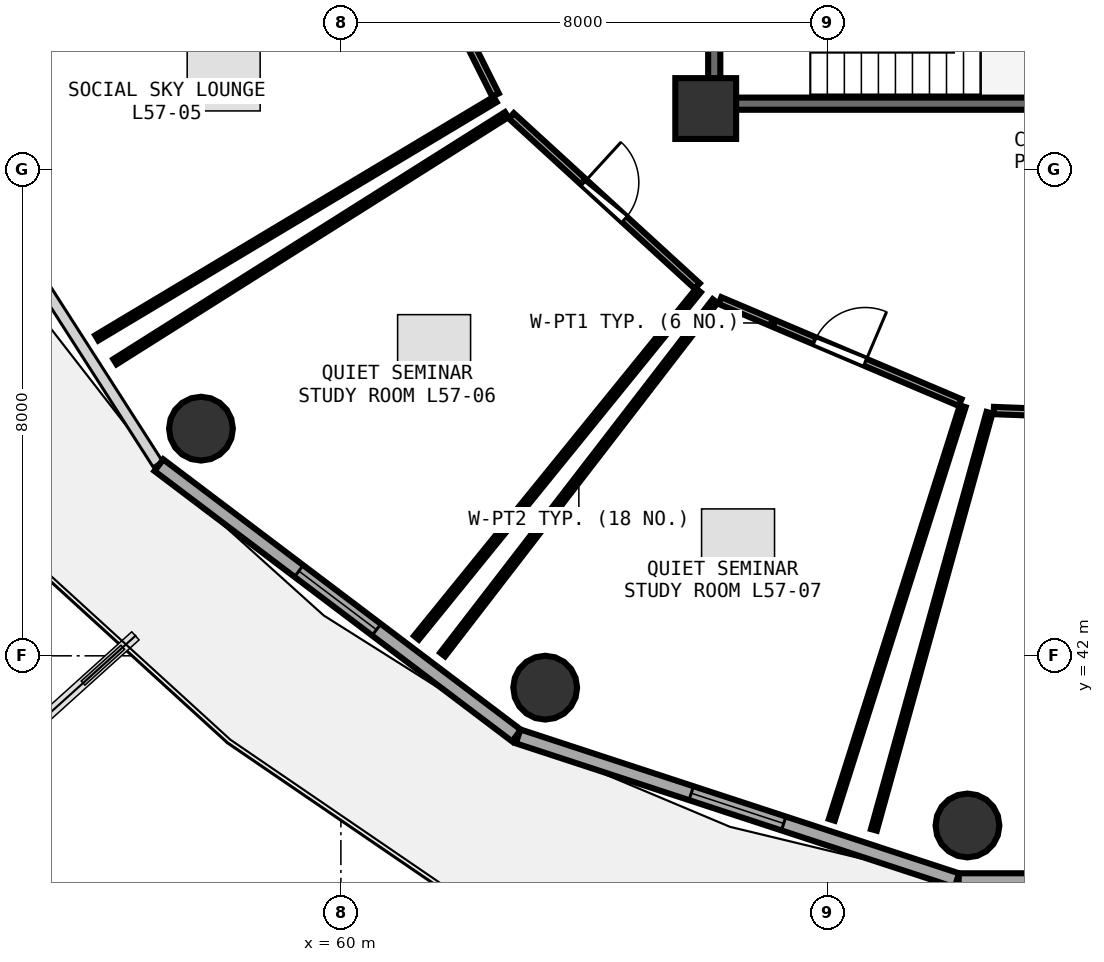
"""IFC4 building model, lengths in metres.
Left out: names, types, materials, properties, quantities, classifications, styles, units other than length and angle.
Written with IfcOpenShell. Run it as: python <this file> out.ifc"""

import sys

from ifc_helpers import new_model, si_unit, direction, frame, frame_2d, origin, origin_2d, place, context, subcontext, project, spatial, rectangle, circle, extrude, element, fill, save


model = new_model("IFC4")
c1 = context("Model", 3, precision=1e-05, world=origin(), true_north=direction((0.0, 1.0)))
c2 = subcontext(c1, "Body", "Model", "MODEL_VIEW")
j1 = project(units=[si_unit("LENGTHUNIT", "METRE"), si_unit("PLANEANGLEUNIT", "RADIAN")], contexts=[c1])
p1 = place(None, origin())
s1 = spatial("IfcSite", under=j1, at=p1, CompositionType="ELEMENT")
p2 = place(p1, origin())
s2 = spatial("IfcBuilding", under=s1, at=p2, CompositionType="ELEMENT")
p3 = place(p2, frame((0.0, 0.0, 223.2)))
s3 = spatial("IfcBuildingStorey", under=s2, at=p3, CompositionType="ELEMENT", Elevation=223.2)
p4 = place(p3, frame((66.0, 51.0, 0.0), z_axis=(0.0, 0.0, 1.0), x_axis=(1.0, 0.0, 0.0)))
e1 = element("IfcColumn", 1, at=p4, inside=s3, PredefinedType="PILASTER", context=c2, shape_type="SweptSolid", body=[
    extrude(rectangle(XDim=1.0, YDim=1.0, at=origin_2d()), origin(), (0.0, 0.0, 1.0), 3.75),
])
for number, where, z_axis, x_axis in (
    (2, (57.698, 45.736, 0.0), (0.0, 0.0, 1.0), (1.0, 0.0, 0.0)),
    (3, (63.36, 41.476, 0.0), (0.0, 0.0, 1.0), (1.0, 0.0, 0.0)),
    (4, (70.305, 39.21, 0.0), (0.0, 0.0, 1.0), (1.0, 0.0, 0.0)),
):
    element("IfcColumn", number, at=place(p3, frame(where, z_axis=z_axis, x_axis=x_axis)), inside=s3, PredefinedType="COLUMN", context=c2, shape_type="SweptSolid", body=[
        extrude(circle(Radius=0.525, at=origin_2d()), origin(), (0.0, 0.0, 1.0), 3.75),
    ])
p5 = place(p3, frame((57.006, 45.135, 0.0), z_axis=(0.0, 0.0, 1.0), x_axis=(0.797701674595, -0.603052268338, 0.0)))
e5 = element("IfcWall", 5, at=p5, inside=s3, PredefinedType="SOLIDWALL", context=c2, shape_type="SweptSolid", body=[
    extrude(rectangle(XDim=7.374, YDim=0.24, at=frame_2d((3.687, 0.0))), origin(), (0.0, 0.0, 1.0), 3.475),
])
p6 = place(p5, frame((2.887, 0.0, 0.85)))
e6 = element("IfcOpeningElement", 6, at=p6, cuts=e5, PredefinedType="OPENING", context=c2, shape_type="SweptSolid", body=[
    extrude(rectangle(XDim=1.6, YDim=1.45, at=frame_2d((0.8, 0.725))), frame((0.0, 0.13, 0.0), z_axis=(0.0, -1.0, 0.0), x_axis=(1.0, 0.0, 0.0)), (0.0, 0.0, 1.0), 0.26),
])
p7 = place(p3, frame((62.914, 40.675, 0.0), z_axis=(0.0, 0.0, 1.0), x_axis=(0.95022142767, -0.31157541366, 0.0)))
e7 = element("IfcWall", 7, at=p7, inside=s3, PredefinedType="SOLIDWALL", context=c2, shape_type="SweptSolid", body=[
    extrude(rectangle(XDim=7.594, YDim=0.24, at=frame_2d((3.797, 0.0))), origin(), (0.0, 0.0, 1.0), 3.475),
])
p8 = place(p7, frame((2.997, 0.0, 0.85)))
e8 = element("IfcOpeningElement", 8, at=p8, cuts=e7, PredefinedType="OPENING", context=c2, shape_type="SweptSolid", body=[
    extrude(rectangle(XDim=1.6, YDim=1.45, at=frame_2d((0.8, 0.725))), frame((0.0, 0.13, 0.0), z_axis=(0.0, -1.0, 0.0), x_axis=(1.0, 0.0, 0.0)), (0.0, 0.0, 1.0), 0.26),
])
p9 = place(p3, frame((70.16, 38.304, 0.0), z_axis=(0.0, 0.0, 1.0), x_axis=(1.0, 0.0, 0.0)))
e9 = element("IfcWall", 9, at=p9, inside=s3, PredefinedType="SOLIDWALL", context=c2, shape_type="SweptSolid", body=[
    extrude(rectangle(XDim=7.68, YDim=0.24, at=frame_2d((3.84, 0.0))), origin(), (0.0, 0.0, 1.0), 3.475),
])
p10 = place(p9, frame((3.04, 0.0, 0.85)))
e10 = element("IfcOpeningElement", 10, at=p10, cuts=e9, PredefinedType="OPENING", context=c2, shape_type="SweptSolid", body=[
    extrude(rectangle(XDim=1.6, YDim=1.45, at=frame_2d((0.8, 0.725))), frame((0.0, 0.13, 0.0), z_axis=(0.0, -1.0, 0.0), x_axis=(1.0, 0.0, 0.0)), (0.0, 0.0, 1.0), 0.26),
])
p11 = place(p3, frame((66.26, 51.08, 0.0), z_axis=(0.0, 0.0, 1.0), x_axis=(1.0, 0.0, 0.0)))
e11 = element("IfcWall", 11, at=p11, inside=s3, PredefinedType="SHEAR", context=c2, shape_type="SweptSolid", body=[
    extrude(rectangle(XDim=7.16, YDim=0.2, at=frame_2d((3.58, 0.0))), origin(), (0.0, 0.0, 1.0), 3.49),
])
p12 = place(p3, frame((66.14, 54.27, 0.0), z_axis=(0.0, 0.0, 1.0), x_axis=(0.0, -1.0, 0.0)))
e12 = element("IfcWall", 12, at=p12, inside=s3, PredefinedType="SHEAR", context=c2, shape_type="SweptSolid", body=[
    extrude(rectangle(XDim=3.07, YDim=0.2, at=frame_2d((1.535, 0.0))), origin(), (0.0, 0.0, 1.0), 3.49),
])
p13 = place(p12, frame((1.01, 0.0, 0.0)))
e13 = element("IfcOpeningElement", 13, at=p13, cuts=e12, PredefinedType="OPENING", context=c2, shape_type="SweptSolid", body=[
    extrude(rectangle(XDim=1.05, YDim=2.1, at=frame_2d((0.525, 1.05))), frame((0.0, 0.11, 0.0), z_axis=(0.0, -1.0, 0.0), x_axis=(1.0, 0.0, 0.0)), (0.0, 0.0, 1.0), 0.22),
])
p14 = place(p3, frame((70.738, 46.034, 0.0), z_axis=(0.0, 0.0, 1.0), x_axis=(0.99928078405, -0.037919844777, 0.0)))
e14 = element("IfcWall", 14, at=p14, inside=s3, PredefinedType="PARTITIONING", context=c2, shape_type="SweptSolid", body=[
    extrude(rectangle(XDim=5.389, YDim=0.12, at=frame_2d((2.694, 0.0))), origin(), (0.0, 0.0, 1.0), 3.025),
])
p15 = place(p14, frame((2.244, 0.0, 0.0)))
e15 = element("IfcOpeningElement", 15, at=p15, cuts=e14, PredefinedType="OPENING", context=c2, shape_type="SweptSolid", body=[
    extrude(rectangle(XDim=0.9, YDim=2.08, at=frame_2d((0.45, 1.04))), frame((0.0, 0.07, 0.0), z_axis=(0.0, -1.0, 0.0), x_axis=(1.0, 0.0, 0.0)), (0.0, 0.0, 1.0), 0.14),
])
p16 = place(p3, frame((60.753, 54.793, 0.0), z_axis=(0.0, 0.0, 1.0), x_axis=(0.448191244457, -0.893937698272, 0.0)))
e16 = element("IfcWall", 16, at=p16, inside=s3, PredefinedType="PARTITIONING", context=c2, shape_type="SweptSolid", body=[
    extrude(rectangle(XDim=3.994, YDim=0.12, at=frame_2d((1.997, 0.0))), origin(), (0.0, 0.0, 1.0), 3.025),
])
p17 = place(p16, frame((1.547, 0.0, 0.0)))
e17 = element("IfcOpeningElement", 17, at=p17, cuts=e16, PredefinedType="OPENING", context=c2, shape_type="SweptSolid", body=[
    extrude(rectangle(XDim=0.9, YDim=2.08, at=frame_2d((0.45, 1.04))), frame((0.0, 0.07, 0.0), z_axis=(0.0, -1.0, 0.0), x_axis=(1.0, 0.0, 0.0)), (0.0, 0.0, 1.0), 0.14),
])
p18 = place(p3, frame((62.803, 50.879, 0.0), z_axis=(0.0, 0.0, 1.0), x_axis=(0.737723633035, -0.675102837545, 0.0)))
e18 = element("IfcWall", 18, at=p18, inside=s3, PredefinedType="PARTITIONING", context=c2, shape_type="SweptSolid", body=[
    extrude(rectangle(XDim=4.144, YDim=0.12, at=frame_2d((2.072, 0.0))), origin(), (0.0, 0.0, 1.0), 3.025),
])
p19 = place(p18, frame((1.622, 0.0, 0.0)))
e19 = element("IfcOpeningElement", 19, at=p19, cuts=e18, PredefinedType="OPENING", context=c2, shape_type="SweptSolid", body=[
    extrude(rectangle(XDim=0.9, YDim=2.08, at=frame_2d((0.45, 1.04))), frame((0.0, 0.07, 0.0), z_axis=(0.0, -1.0, 0.0), x_axis=(1.0, 0.0, 0.0)), (0.0, 0.0, 1.0), 0.14),
])
p20 = place(p3, frame((66.233, 47.843, 0.0), z_axis=(0.0, 0.0, 1.0), x_axis=(0.920481353999, -0.390786485105, 0.0)))
e20 = element("IfcWall", 20, at=p20, inside=s3, PredefinedType="PARTITIONING", context=c2, shape_type="SweptSolid", body=[
    extrude(rectangle(XDim=4.292, YDim=0.12, at=frame_2d((2.146, 0.0))), origin(), (0.0, 0.0, 1.0), 3.235),
])
p21 = place(p20, frame((1.696, 0.0, 0.0)))
e21 = element("IfcOpeningElement", 21, at=p21, cuts=e20, PredefinedType="OPENING", context=c2, shape_type="SweptSolid", body=[
    extrude(rectangle(XDim=0.9, YDim=2.08, at=frame_2d((0.45, 1.04))), frame((0.0, 0.07, 0.0), z_axis=(0.0, -1.0, 0.0), x_axis=(1.0, 0.0, 0.0)), (0.0, 0.0, 1.0), 0.14),
])
p22 = place(p3, frame((68.766, 39.137, 0.0), z_axis=(0.0, 0.0, 1.0), x_axis=(0.267125564166, 0.96366173161, 0.0)))
e22 = element("IfcWall", 22, at=p22, inside=s3, PredefinedType="PARTITIONING", context=c2, shape_type="SweptSolid", body=[
    extrude(rectangle(XDim=7.119, YDim=0.1, at=frame_2d((3.56, 0.0))), origin(), (0.0, 0.0, 1.0), 3.075),
])
p23 = place(p3, frame((62.536, 51.148, 0.0), z_axis=(0.0, 0.0, 1.0), x_axis=(-0.858084969996, -0.513507725615, 0.0)))
e23 = element("IfcWall", 23, at=p23, inside=s3, PredefinedType="PARTITIONING", context=c2, shape_type="SweptSolid", body=[
    extrude(rectangle(XDim=7.634, YDim=0.1, at=frame_2d((3.817, 0.0))), origin(), (0.0, 0.0, 1.0), 3.025),
])
p24 = place(p3, frame((65.88, 48.01, 0.0), z_axis=(0.0, 0.0, 1.0), x_axis=(-0.630262810813, -0.776381857919, 0.0)))
e24 = element("IfcWall", 24, at=p24, inside=s3, PredefinedType="PARTITIONING", context=c2, shape_type="SweptSolid", body=[
    extrude(rectangle(XDim=7.358, YDim=0.1, at=frame_2d((3.679, 0.0))), origin(), (0.0, 0.0, 1.0), 3.025),
])
p25 = place(p3, frame((56.284, 46.836, 0.0), z_axis=(0.0, 0.0, 1.0), x_axis=(0.84583000996, 0.533452522959, 0.0)))
e25 = element("IfcWall", 25, at=p25, inside=s3, PredefinedType="PARTITIONING", context=c2, shape_type="SweptSolid", body=[
    extrude(rectangle(XDim=7.615, YDim=0.1, at=frame_2d((3.808, 0.0))), origin(), (0.0, 0.0, 1.0), 3.075),
])
p26 = place(p3, frame((70.227, 46.104, 0.0), z_axis=(0.0, 0.0, 1.0), x_axis=(-0.30191088513, -0.953336151334, 0.0)))
e26 = element("IfcWall", 26, at=p26, inside=s3, PredefinedType="PARTITIONING", context=c2, shape_type="SweptSolid", body=[
    extrude(rectangle(XDim=7.134, YDim=0.1, at=frame_2d((3.567, 0.0))), origin(), (0.0, 0.0, 1.0), 3.075),
])
p27 = place(p3, frame((61.673, 42.022, 0.0), z_axis=(0.0, 0.0, 1.0), x_axis=(0.610486992252, 0.792026282576, 0.0)))
e27 = element("IfcWall", 27, at=p27, inside=s3, PredefinedType="PARTITIONING", context=c2, shape_type="SweptSolid", body=[
    extrude(rectangle(XDim=7.339, YDim=0.1, at=frame_2d((3.669, 0.0))), origin(), (0.0, 0.0, 1.0), 3.025),
])
p28 = place(p6, origin())
e28 = element("IfcWindow", 28, at=p28, inside=s3, PartitioningType="SINGLE_PANEL", PredefinedType="WINDOW", context=c2, shape_type="SweptSolid", body=[
    extrude(rectangle(XDim=1.6, YDim=1.45, at=frame_2d((0.8, 0.725))), frame((0.0, 0.03, 0.0), z_axis=(0.0, -1.0, 0.0), x_axis=(1.0, 0.0, 0.0)), (0.0, 0.0, 1.0), 0.06),
])
fill(e6, e28)
p29 = place(p8, origin())
e29 = element("IfcWindow", 29, at=p29, inside=s3, PartitioningType="SINGLE_PANEL", PredefinedType="WINDOW", context=c2, shape_type="SweptSolid", body=[
    extrude(rectangle(XDim=1.6, YDim=1.45, at=frame_2d((0.8, 0.725))), frame((0.0, 0.03, 0.0), z_axis=(0.0, -1.0, 0.0), x_axis=(1.0, 0.0, 0.0)), (0.0, 0.0, 1.0), 0.06),
])
fill(e8, e29)
p30 = place(p19, origin())
e30 = element("IfcDoor", 30, at=p30, inside=s3, OperationType="SINGLE_SWING_LEFT", PredefinedType="DOOR", context=c2, shape_type="SweptSolid", body=[
    extrude(rectangle(XDim=0.9, YDim=2.08, at=frame_2d((0.45, 1.04))), frame((0.0, 0.025, 0.0), z_axis=(0.0, -1.0, 0.0), x_axis=(1.0, 0.0, 0.0)), (0.0, 0.0, 1.0), 0.05),
])
fill(e19, e30)
p31 = place(p21, origin())
e31 = element("IfcDoor", 31, at=p31, inside=s3, OperationType="SINGLE_SWING_RIGHT", PredefinedType="DOOR", context=c2, shape_type="SweptSolid", body=[
    extrude(rectangle(XDim=0.9, YDim=2.08, at=frame_2d((0.45, 1.04))), frame((0.0, 0.025, 0.0), z_axis=(0.0, -1.0, 0.0), x_axis=(1.0, 0.0, 0.0)), (0.0, 0.0, 1.0), 0.05),
])
fill(e21, e31)
save(model, sys.argv[1])
